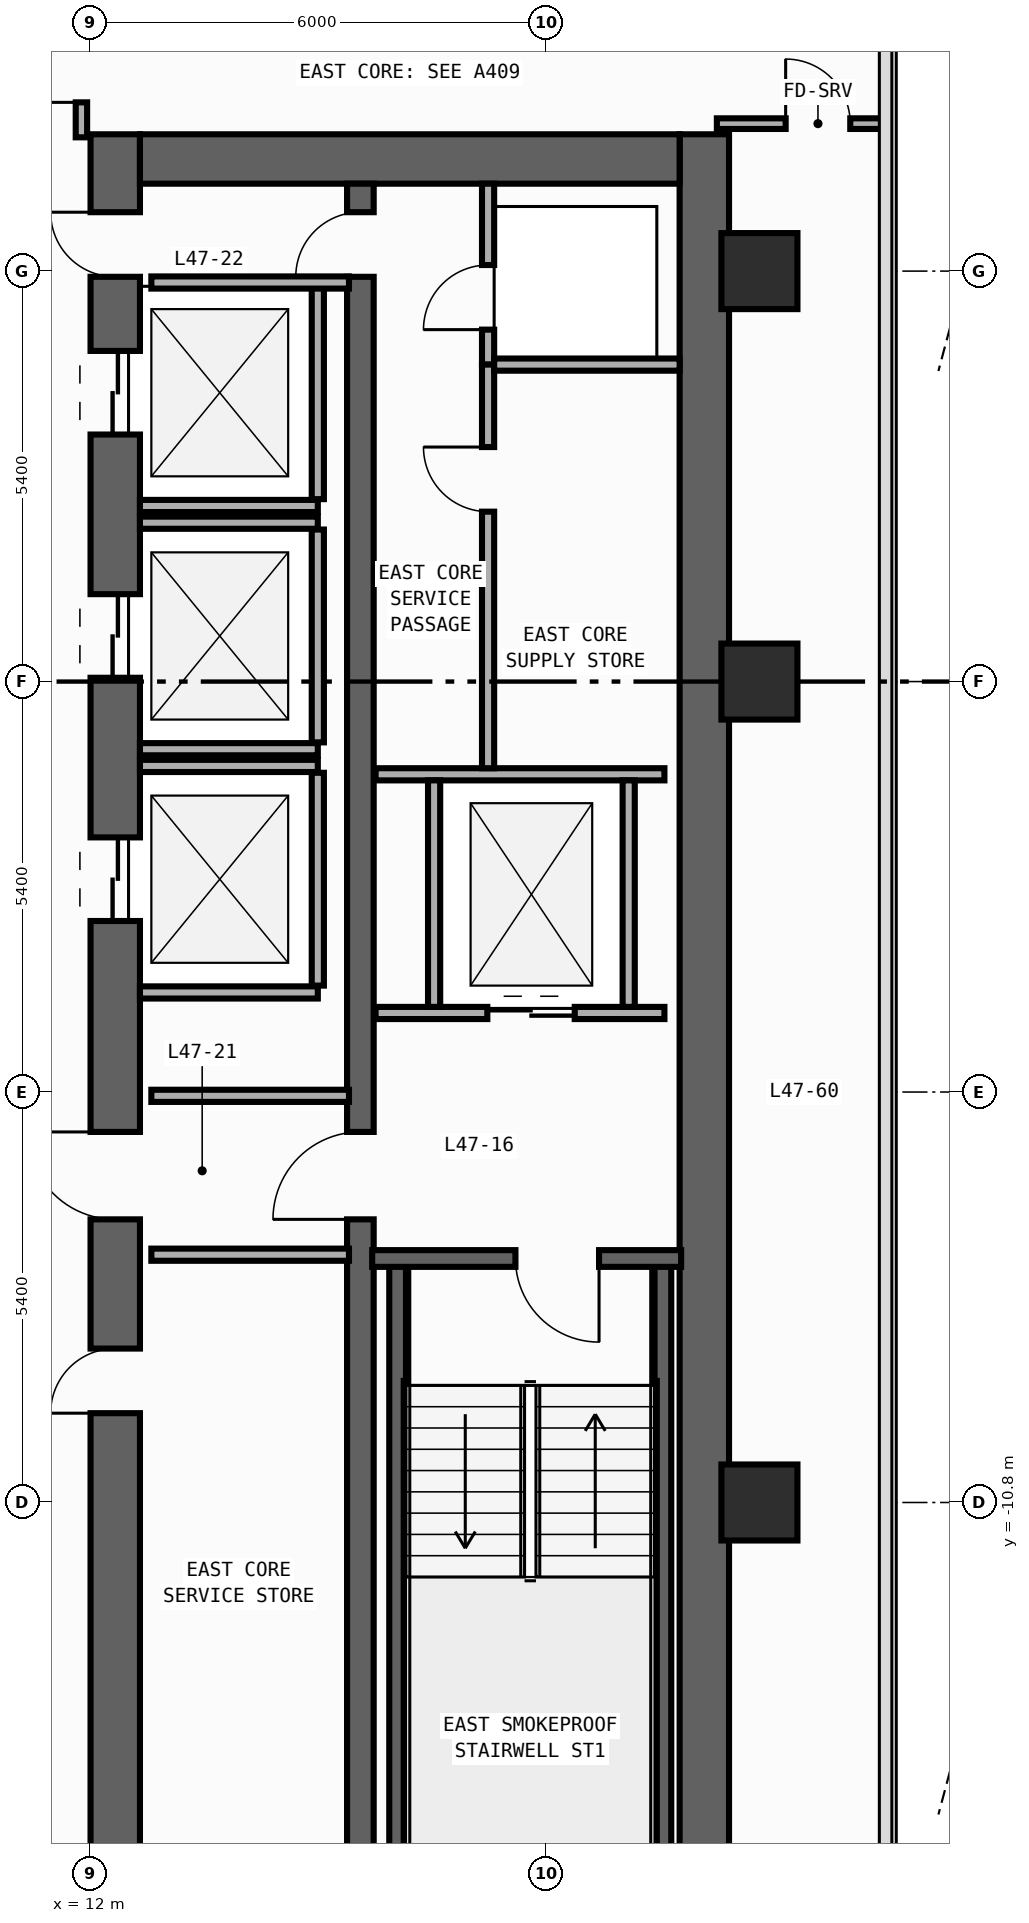
"""IFC4 building model, lengths in metres.
Left out: names, types, materials, properties, quantities, classifications, styles, units other than length and angle.
Written with IfcOpenShell. Run it as: python <this file> out.ifc"""

import sys

from ifc_helpers import new_model, si_unit, direction, frame, frame_2d, origin, origin_2d, place, context, subcontext, project, spatial, rectangle, extrude, element, fill, save


model = new_model("IFC4")
c1 = context("Model", 3, precision=1e-05, world=origin(), true_north=direction((0.0, 1.0)))
c2 = subcontext(c1, "Body", "Model", "MODEL_VIEW")
j1 = project(units=[si_unit("LENGTHUNIT", "METRE"), si_unit("PLANEANGLEUNIT", "RADIAN")], contexts=[c1])
p1 = place(None, origin())
s1 = spatial("IfcSite", under=j1, at=p1, CompositionType="ELEMENT")
p2 = place(p1, origin())
s2 = spatial("IfcBuilding", under=s1, at=p2, CompositionType="ELEMENT")
p3 = place(p2, frame((0.0, 0.0, 203.0)))
s3 = spatial("IfcBuildingStorey", under=s2, at=p3, CompositionType="ELEMENT", Elevation=203.0)
p4 = place(p3, frame((12.325, -19.8, 0.0), z_axis=(0.0, 0.0, 1.0), x_axis=(0.0, 1.0, 0.0)))
e1 = element("IfcWall", 1, at=p4, inside=s3, PredefinedType="SHEAR", context=c2, shape_type="SweptSolid", body=[
    extrude(rectangle(XDim=27.0, YDim=0.65, at=frame_2d((13.5, 0.0))), origin(), (0.0, 0.0, 1.0), 3.54),
])
p5 = place(p4, frame((23.05, 0.0, 0.0)))
e2 = element("IfcOpeningElement", 2, at=p5, cuts=e1, PredefinedType="OPENING", context=c2, shape_type="SweptSolid", body=[
    extrude(rectangle(XDim=1.1, YDim=2.2, at=frame_2d((0.55, 1.1))), frame((0.0, 0.335, 0.0), z_axis=(0.0, -1.0, 0.0), x_axis=(1.0, 0.0, 0.0)), (0.0, 0.0, 1.0), 0.67),
])
p6 = place(p4, frame((19.85, 0.0, 0.0)))
e3 = element("IfcOpeningElement", 3, at=p6, cuts=e1, PredefinedType="OPENING", context=c2, shape_type="SweptSolid", body=[
    extrude(rectangle(XDim=1.1, YDim=2.2, at=frame_2d((0.55, 1.1))), frame((0.0, 0.335, 0.0), z_axis=(0.0, -1.0, 0.0), x_axis=(1.0, 0.0, 0.0)), (0.0, 0.0, 1.0), 0.67),
])
p7 = place(p4, frame((16.65, 0.0, 0.0)))
e4 = element("IfcOpeningElement", 4, at=p7, cuts=e1, PredefinedType="OPENING", context=c2, shape_type="SweptSolid", body=[
    extrude(rectangle(XDim=1.1, YDim=2.2, at=frame_2d((0.55, 1.1))), frame((0.0, 0.335, 0.0), z_axis=(0.0, -1.0, 0.0), x_axis=(1.0, 0.0, 0.0)), (0.0, 0.0, 1.0), 0.67),
])
p8 = place(p4, frame((10.175, 0.0, 0.0)))
e5 = element("IfcOpeningElement", 5, at=p8, cuts=e1, PredefinedType="OPENING", context=c2, shape_type="SweptSolid", body=[
    extrude(rectangle(XDim=0.85, YDim=2.1, at=frame_2d((0.425, 1.05))), frame((0.0, 0.335, 0.0), z_axis=(0.0, -1.0, 0.0), x_axis=(1.0, 0.0, 0.0)), (0.0, 0.0, 1.0), 0.67),
])
p9 = place(p4, frame((12.725, 0.0, 0.0)))
e6 = element("IfcOpeningElement", 6, at=p9, cuts=e1, PredefinedType="OPENING", context=c2, shape_type="SweptSolid", body=[
    extrude(rectangle(XDim=1.15, YDim=2.2, at=frame_2d((0.575, 1.1))), frame((0.0, 0.335, 0.0), z_axis=(0.0, -1.0, 0.0), x_axis=(1.0, 0.0, 0.0)), (0.0, 0.0, 1.0), 0.67),
])
p10 = place(p4, frame((25.125, 0.0, 0.0)))
e7 = element("IfcOpeningElement", 7, at=p10, cuts=e1, PredefinedType="OPENING", context=c2, shape_type="SweptSolid", body=[
    extrude(rectangle(XDim=0.85, YDim=2.1, at=frame_2d((0.425, 1.05))), frame((0.0, 0.335, 0.0), z_axis=(0.0, -1.0, 0.0), x_axis=(1.0, 0.0, 0.0)), (0.0, 0.0, 1.0), 0.67),
])
p11 = place(p3, frame((20.075, -19.8, 0.0), z_axis=(0.0, 0.0, 1.0), x_axis=(0.0, 1.0, 0.0)))
e8 = element("IfcWall", 8, at=p11, inside=s3, PredefinedType="SHEAR", context=c2, shape_type="SweptSolid", body=[
    extrude(rectangle(XDim=27.0, YDim=0.65, at=frame_2d((13.5, 0.0))), origin(), (0.0, 0.0, 1.0), 3.54),
])
p12 = place(p3, frame((12.65, 6.875, 0.0), z_axis=(0.0, 0.0, 1.0), x_axis=(1.0, 0.0, 0.0)))
e9 = element("IfcWall", 9, at=p12, inside=s3, PredefinedType="SHEAR", context=c2, shape_type="SweptSolid", body=[
    extrude(rectangle(XDim=7.1, YDim=0.65, at=frame_2d((3.55, 0.0))), origin(), (0.0, 0.0, 1.0), 3.54),
])
p13 = place(p3, frame((15.55, -19.15, 0.0), z_axis=(0.0, 0.0, 1.0), x_axis=(0.0, 1.0, 0.0)))
e10 = element("IfcWall", 10, at=p13, inside=s3, PredefinedType="SHEAR", context=c2, shape_type="SweptSolid", body=[
    extrude(rectangle(XDim=25.7, YDim=0.35, at=frame_2d((12.85, 0.0))), origin(), (0.0, 0.0, 1.0), 3.54),
])
p14 = place(p13, frame((12.075, 0.0, 0.0)))
e11 = element("IfcOpeningElement", 11, at=p14, cuts=e10, PredefinedType="OPENING", context=c2, shape_type="SweptSolid", body=[
    extrude(rectangle(XDim=1.15, YDim=2.2, at=frame_2d((0.575, 1.1))), frame((0.0, 0.185, 0.0), z_axis=(0.0, -1.0, 0.0), x_axis=(1.0, 0.0, 0.0)), (0.0, 0.0, 1.0), 0.37),
])
p15 = place(p13, frame((24.475, 0.0, 0.0)))
e12 = element("IfcOpeningElement", 12, at=p15, cuts=e10, PredefinedType="OPENING", context=c2, shape_type="SweptSolid", body=[
    extrude(rectangle(XDim=0.85, YDim=2.1, at=frame_2d((0.425, 1.05))), frame((0.0, 0.185, 0.0), z_axis=(0.0, -1.0, 0.0), x_axis=(1.0, 0.0, 0.0)), (0.0, 0.0, 1.0), 0.37),
])
for number, where, z_axis, x_axis in (
    (13, (16.04, -19.01, 0.0), (0.0, 0.0, 1.0), (0.0, 1.0, 0.0)),
    (14, (19.53, -19.01, 0.0), (0.0, 0.0, 1.0), (0.0, 1.0, 0.0)),
):
    element("IfcWall", number, at=place(p3, frame(where, z_axis=z_axis, x_axis=x_axis)), inside=s3, PredefinedType="SHEAR", context=c2, shape_type="SweptSolid", body=[
        extrude(rectangle(XDim=11.42, YDim=0.22, at=frame_2d((5.71, 0.0))), origin(), (0.0, 0.0, 1.0), 3.54),
    ])
p16 = place(p3, frame((19.77, -7.59, 0.0), z_axis=(0.0, 0.0, 1.0), x_axis=(-1.0, 0.0, 0.0)))
e15 = element("IfcWall", 15, at=p16, inside=s3, PredefinedType="SHEAR", context=c2, shape_type="SweptSolid", body=[
    extrude(rectangle(XDim=4.065, YDim=0.22, at=frame_2d((2.032, 0.0))), origin(), (0.0, 0.0, 1.0), 3.54),
])
p17 = place(p16, frame((1.08, 0.0, 0.0)))
e16 = element("IfcOpeningElement", 16, at=p17, cuts=e15, PredefinedType="OPENING", context=c2, shape_type="SweptSolid", body=[
    extrude(rectangle(XDim=1.1, YDim=2.2, at=frame_2d((0.55, 1.1))), frame((0.0, 0.12, 0.0), z_axis=(0.0, -1.0, 0.0), x_axis=(1.0, 0.0, 0.0)), (0.0, 0.0, 1.0), 0.24),
])
for number, where, z_axis, x_axis in (
    (17, (20.8, -10.8, 0.0), (0.0, 0.0, 1.0), (1.0, 0.0, 0.0)),
    (18, (20.8, 0.0, 0.0), (0.0, 0.0, 1.0), (1.0, 0.0, 0.0)),
    (19, (20.8, 5.4, 0.0), (0.0, 0.0, 1.0), (1.0, 0.0, 0.0)),
):
    element("IfcColumn", number, at=place(p3, frame(where, z_axis=z_axis, x_axis=x_axis)), inside=s3, PredefinedType="COLUMN", context=c2, shape_type="SweptSolid", body=[
        extrude(rectangle(XDim=1.0, YDim=1.0, at=origin_2d()), origin(), (0.0, 0.0, 1.0), 3.8),
    ])
p18 = place(p3, frame((12.65, 2.31, 0.0), z_axis=(0.0, 0.0, 1.0), x_axis=(1.0, 0.0, 0.0)))
e20 = element("IfcWall", 20, at=p18, inside=s3, PredefinedType="STANDARD", context=c2, shape_type="SweptSolid", body=[
    extrude(rectangle(XDim=2.34, YDim=0.16, at=frame_2d((1.17, 0.0))), origin(), (0.0, 0.0, 1.0), 3.54),
])
p19 = place(p3, frame((14.99, 2.4, 0.0), z_axis=(0.0, 0.0, 1.0), x_axis=(0.0, 1.0, 0.0)))
e21 = element("IfcWall", 21, at=p19, inside=s3, PredefinedType="STANDARD", context=c2, shape_type="SweptSolid", body=[
    extrude(rectangle(XDim=2.8, YDim=0.16, at=frame_2d((1.4, 0.0))), origin(), (0.0, 0.0, 1.0), 3.54),
])
for number, where, z_axis, x_axis in (
    (22, (12.65, -0.89, 0.0), (0.0, 0.0, 1.0), (1.0, 0.0, 0.0)),
    (23, (12.65, 2.09, 0.0), (0.0, 0.0, 1.0), (1.0, 0.0, 0.0)),
):
    element("IfcWall", number, at=place(p3, frame(where, z_axis=z_axis, x_axis=x_axis)), inside=s3, PredefinedType="STANDARD", context=c2, shape_type="SweptSolid", body=[
        extrude(rectangle(XDim=2.34, YDim=0.16, at=frame_2d((1.17, 0.0))), origin(), (0.0, 0.0, 1.0), 3.54),
    ])
p20 = place(p3, frame((14.99, -0.8, 0.0), z_axis=(0.0, 0.0, 1.0), x_axis=(0.0, 1.0, 0.0)))
e24 = element("IfcWall", 24, at=p20, inside=s3, PredefinedType="STANDARD", context=c2, shape_type="SweptSolid", body=[
    extrude(rectangle(XDim=2.8, YDim=0.16, at=frame_2d((1.4, 0.0))), origin(), (0.0, 0.0, 1.0), 3.54),
])
for number, where, z_axis, x_axis in (
    (25, (12.65, -4.09, 0.0), (0.0, 0.0, 1.0), (1.0, 0.0, 0.0)),
    (26, (12.65, -1.11, 0.0), (0.0, 0.0, 1.0), (1.0, 0.0, 0.0)),
):
    element("IfcWall", number, at=place(p3, frame(where, z_axis=z_axis, x_axis=x_axis)), inside=s3, PredefinedType="STANDARD", context=c2, shape_type="SweptSolid", body=[
        extrude(rectangle(XDim=2.34, YDim=0.16, at=frame_2d((1.17, 0.0))), origin(), (0.0, 0.0, 1.0), 3.54),
    ])
p21 = place(p3, frame((14.99, -4.0, 0.0), z_axis=(0.0, 0.0, 1.0), x_axis=(0.0, 1.0, 0.0)))
e27 = element("IfcWall", 27, at=p21, inside=s3, PredefinedType="STANDARD", context=c2, shape_type="SweptSolid", body=[
    extrude(rectangle(XDim=2.8, YDim=0.16, at=frame_2d((1.4, 0.0))), origin(), (0.0, 0.0, 1.0), 3.54),
])
p22 = place(p3, frame((15.75, -4.36, 0.0), z_axis=(0.0, 0.0, 1.0), x_axis=(1.0, 0.0, 0.0)))
e28 = element("IfcWall", 28, at=p22, inside=s3, PredefinedType="STANDARD", context=c2, shape_type="SweptSolid", body=[
    extrude(rectangle(XDim=3.8, YDim=0.16, at=frame_2d((1.9, 0.0))), origin(), (0.0, 0.0, 1.0), 3.54),
])
p23 = place(p22, frame((1.47, 0.0, 0.0)))
e29 = element("IfcOpeningElement", 29, at=p23, cuts=e28, PredefinedType="OPENING", context=c2, shape_type="SweptSolid", body=[
    extrude(rectangle(XDim=1.15, YDim=2.2, at=frame_2d((0.575, 1.1))), frame((0.0, 0.09, 0.0), z_axis=(0.0, -1.0, 0.0), x_axis=(1.0, 0.0, 0.0)), (0.0, 0.0, 1.0), 0.18),
])
p24 = place(p3, frame((15.75, -1.22, 0.0), z_axis=(0.0, 0.0, 1.0), x_axis=(1.0, 0.0, 0.0)))
e30 = element("IfcWall", 30, at=p24, inside=s3, PredefinedType="STANDARD", context=c2, shape_type="SweptSolid", body=[
    extrude(rectangle(XDim=3.8, YDim=0.16, at=frame_2d((1.9, 0.0))), origin(), (0.0, 0.0, 1.0), 3.54),
])
for number, where, z_axis, x_axis in (
    (31, (16.52, -4.28, 0.0), (0.0, 0.0, 1.0), (0.0, 1.0, 0.0)),
    (32, (19.08, -4.28, 0.0), (0.0, 0.0, 1.0), (0.0, 1.0, 0.0)),
):
    element("IfcWall", number, at=place(p3, frame(where, z_axis=z_axis, x_axis=x_axis)), inside=s3, PredefinedType="STANDARD", context=c2, shape_type="SweptSolid", body=[
        extrude(rectangle(XDim=2.98, YDim=0.16, at=frame_2d((1.49, 0.0))), origin(), (0.0, 0.0, 1.0), 3.54),
    ])
for number, where, z_axis, x_axis in (
    (33, (12.8, -5.45, 0.0), (0.0, 0.0, 1.0), (1.0, 0.0, 0.0)),
    (34, (12.8, -7.54, 0.0), (0.0, 0.0, 1.0), (1.0, 0.0, 0.0)),
    (35, (12.8, 5.25, 0.0), (0.0, 0.0, 1.0), (1.0, 0.0, 0.0)),
):
    element("IfcWall", number, at=place(p3, frame(where, z_axis=z_axis, x_axis=x_axis)), inside=s3, PredefinedType="STANDARD", context=c2, shape_type="SweptSolid", body=[
        extrude(rectangle(XDim=2.6, YDim=0.16, at=frame_2d((1.3, 0.0))), origin(), (0.0, 0.0, 1.0), 3.54),
    ])
p25 = place(p3, frame((17.23, 4.17, 0.0), z_axis=(0.0, 0.0, 1.0), x_axis=(0.0, 1.0, 0.0)))
e36 = element("IfcWall", 36, at=p25, inside=s3, PredefinedType="PARTITIONING", context=c2, shape_type="SweptSolid", body=[
    extrude(rectangle(XDim=2.38, YDim=0.16, at=frame_2d((1.19, 0.0))), origin(), (0.0, 0.0, 1.0), 3.54),
])
p26 = place(p25, frame((0.46, 0.0, 0.0)))
e37 = element("IfcOpeningElement", 37, at=p26, cuts=e36, PredefinedType="OPENING", context=c2, shape_type="SweptSolid", body=[
    extrude(rectangle(XDim=0.85, YDim=2.1, at=frame_2d((0.425, 1.05))), frame((0.0, 0.09, 0.0), z_axis=(0.0, -1.0, 0.0), x_axis=(1.0, 0.0, 0.0)), (0.0, 0.0, 1.0), 0.18),
])
p27 = place(p3, frame((17.23, -1.14, 0.0), z_axis=(0.0, 0.0, 1.0), x_axis=(0.0, 1.0, 0.0)))
e38 = element("IfcWall", 38, at=p27, inside=s3, PredefinedType="PARTITIONING", context=c2, shape_type="SweptSolid", body=[
    extrude(rectangle(XDim=5.31, YDim=0.16, at=frame_2d((2.655, 0.0))), origin(), (0.0, 0.0, 1.0), 3.54),
])
p28 = place(p27, frame((3.375, 0.0, 0.0)))
e39 = element("IfcOpeningElement", 39, at=p28, cuts=e38, PredefinedType="OPENING", context=c2, shape_type="SweptSolid", body=[
    extrude(rectangle(XDim=0.85, YDim=2.1, at=frame_2d((0.425, 1.05))), frame((0.0, 0.09, 0.0), z_axis=(0.0, -1.0, 0.0), x_axis=(1.0, 0.0, 0.0)), (0.0, 0.0, 1.0), 0.18),
])
p29 = place(p3, frame((17.31, 4.17, 0.0), z_axis=(0.0, 0.0, 1.0), x_axis=(1.0, 0.0, 0.0)))
e40 = element("IfcWall", 40, at=p29, inside=s3, PredefinedType="PARTITIONING", context=c2, shape_type="SweptSolid", body=[
    extrude(rectangle(XDim=2.44, YDim=0.16, at=frame_2d((1.22, 0.0))), origin(), (0.0, 0.0, 1.0), 3.54),
])
p30 = place(p3, frame((11.88, 7.16, 0.0), z_axis=(0.0, 0.0, 1.0), x_axis=(0.0, 1.0, 0.0)))
e41 = element("IfcWall", 41, at=p30, inside=s3, PredefinedType="PARTITIONING", context=c2, shape_type="SweptSolid", body=[
    extrude(rectangle(XDim=8.855, YDim=0.15, at=frame_2d((4.427, 0.0))), origin(), (0.0, 0.0, 1.0), 3.54),
])
p31 = place(p30, frame((0.46, 0.0, 0.0)))
e42 = element("IfcOpeningElement", 42, at=p31, cuts=e41, PredefinedType="OPENING", context=c2, shape_type="SweptSolid", body=[
    extrude(rectangle(XDim=0.9, YDim=2.15, at=frame_2d((0.45, 1.075))), frame((0.0, 0.085, 0.0), z_axis=(0.0, -1.0, 0.0), x_axis=(1.0, 0.0, 0.0)), (0.0, 0.0, 1.0), 0.17),
])
p32 = place(p3, frame((20.24, 7.34, 0.0), z_axis=(0.0, 0.0, 1.0), x_axis=(1.0, 0.0, 0.0)))
e43 = element("IfcWall", 43, at=p32, inside=s3, PredefinedType="PARTITIONING", context=c2, shape_type="SweptSolid", body=[
    extrude(rectangle(XDim=2.215, YDim=0.14, at=frame_2d((1.107, 0.0))), origin(), (0.0, 0.0, 1.0), 3.54),
])
p33 = place(p32, frame((0.905, 0.0, 0.0)))
e44 = element("IfcOpeningElement", 44, at=p33, cuts=e43, PredefinedType="OPENING", context=c2, shape_type="SweptSolid", body=[
    extrude(rectangle(XDim=0.85, YDim=2.1, at=frame_2d((0.425, 1.05))), frame((0.0, 0.08, 0.0), z_axis=(0.0, -1.0, 0.0), x_axis=(1.0, 0.0, 0.0)), (0.0, 0.0, 1.0), 0.16),
])
p34 = place(p17, origin())
e45 = element("IfcDoor", 45, at=p34, inside=s3, OperationType="SINGLE_SWING_LEFT", PredefinedType="DOOR", context=c2, shape_type="SweptSolid", body=[
    extrude(rectangle(XDim=1.1, YDim=2.2, at=frame_2d((0.55, 1.1))), frame((0.0, 0.025, 0.0), z_axis=(0.0, -1.0, 0.0), x_axis=(1.0, 0.0, 0.0)), (0.0, 0.0, 1.0), 0.05),
])
fill(e16, e45)
p35 = place(p5, origin())
e46 = element("IfcDoor", 46, at=p35, inside=s3, OperationType="DOUBLE_DOOR_SLIDING", PredefinedType="DOOR", context=c2, shape_type="SweptSolid", body=[
    extrude(rectangle(XDim=1.1, YDim=2.2, at=frame_2d((0.55, 1.1))), frame((0.0, 0.025, 0.0), z_axis=(0.0, -1.0, 0.0), x_axis=(1.0, 0.0, 0.0)), (0.0, 0.0, 1.0), 0.05),
])
fill(e2, e46)
p36 = place(p6, origin())
e47 = element("IfcDoor", 47, at=p36, inside=s3, OperationType="DOUBLE_DOOR_SLIDING", PredefinedType="DOOR", context=c2, shape_type="SweptSolid", body=[
    extrude(rectangle(XDim=1.1, YDim=2.2, at=frame_2d((0.55, 1.1))), frame((0.0, 0.025, 0.0), z_axis=(0.0, -1.0, 0.0), x_axis=(1.0, 0.0, 0.0)), (0.0, 0.0, 1.0), 0.05),
])
fill(e3, e47)
p37 = place(p7, origin())
e48 = element("IfcDoor", 48, at=p37, inside=s3, OperationType="DOUBLE_DOOR_SLIDING", PredefinedType="DOOR", context=c2, shape_type="SweptSolid", body=[
    extrude(rectangle(XDim=1.1, YDim=2.2, at=frame_2d((0.55, 1.1))), frame((0.0, 0.025, 0.0), z_axis=(0.0, -1.0, 0.0), x_axis=(1.0, 0.0, 0.0)), (0.0, 0.0, 1.0), 0.05),
])
fill(e4, e48)
p38 = place(p8, origin())
e49 = element("IfcDoor", 49, at=p38, inside=s3, OperationType="SINGLE_SWING_LEFT", PredefinedType="DOOR", context=c2, shape_type="SweptSolid", body=[
    extrude(rectangle(XDim=0.85, YDim=2.1, at=frame_2d((0.425, 1.05))), frame((0.0, 0.025, 0.0), z_axis=(0.0, -1.0, 0.0), x_axis=(1.0, 0.0, 0.0)), (0.0, 0.0, 1.0), 0.05),
])
fill(e5, e49)
p39 = place(p9, origin())
e50 = element("IfcDoor", 50, at=p39, inside=s3, OperationType="SINGLE_SWING_RIGHT", PredefinedType="DOOR", context=c2, shape_type="SweptSolid", body=[
    extrude(rectangle(XDim=1.15, YDim=2.2, at=frame_2d((0.575, 1.1))), frame((0.0, 0.025, 0.0), z_axis=(0.0, -1.0, 0.0), x_axis=(1.0, 0.0, 0.0)), (0.0, 0.0, 1.0), 0.05),
])
fill(e6, e50)
p40 = place(p14, origin())
e51 = element("IfcDoor", 51, at=p40, inside=s3, OperationType="SINGLE_SWING_LEFT", PredefinedType="DOOR", context=c2, shape_type="SweptSolid", body=[
    extrude(rectangle(XDim=1.15, YDim=2.2, at=frame_2d((0.575, 1.1))), frame((0.0, 0.025, 0.0), z_axis=(0.0, -1.0, 0.0), x_axis=(1.0, 0.0, 0.0)), (0.0, 0.0, 1.0), 0.05),
])
fill(e11, e51)
p41 = place(p10, origin())
e52 = element("IfcDoor", 52, at=p41, inside=s3, OperationType="SINGLE_SWING_RIGHT", PredefinedType="DOOR", context=c2, shape_type="SweptSolid", body=[
    extrude(rectangle(XDim=0.85, YDim=2.1, at=frame_2d((0.425, 1.05))), frame((0.0, 0.025, 0.0), z_axis=(0.0, -1.0, 0.0), x_axis=(1.0, 0.0, 0.0)), (0.0, 0.0, 1.0), 0.05),
])
fill(e7, e52)
p42 = place(p15, origin())
e53 = element("IfcDoor", 53, at=p42, inside=s3, OperationType="SINGLE_SWING_LEFT", PredefinedType="DOOR", context=c2, shape_type="SweptSolid", body=[
    extrude(rectangle(XDim=0.85, YDim=2.1, at=frame_2d((0.425, 1.05))), frame((0.0, 0.025, 0.0), z_axis=(0.0, -1.0, 0.0), x_axis=(1.0, 0.0, 0.0)), (0.0, 0.0, 1.0), 0.05),
])
fill(e12, e53)
p43 = place(p23, origin())
e54 = element("IfcDoor", 54, at=p43, inside=s3, OperationType="DOUBLE_DOOR_SLIDING", PredefinedType="DOOR", context=c2, shape_type="SweptSolid", body=[
    extrude(rectangle(XDim=1.15, YDim=2.2, at=frame_2d((0.575, 1.1))), frame((0.0, 0.025, 0.0), z_axis=(0.0, -1.0, 0.0), x_axis=(1.0, 0.0, 0.0)), (0.0, 0.0, 1.0), 0.05),
])
fill(e29, e54)
p44 = place(p26, origin())
e55 = element("IfcDoor", 55, at=p44, inside=s3, OperationType="SINGLE_SWING_LEFT", PredefinedType="DOOR", context=c2, shape_type="SweptSolid", body=[
    extrude(rectangle(XDim=0.85, YDim=2.1, at=frame_2d((0.425, 1.05))), frame((0.0, 0.025, 0.0), z_axis=(0.0, -1.0, 0.0), x_axis=(1.0, 0.0, 0.0)), (0.0, 0.0, 1.0), 0.05),
])
fill(e37, e55)
p45 = place(p28, origin())
e56 = element("IfcDoor", 56, at=p45, inside=s3, OperationType="SINGLE_SWING_RIGHT", PredefinedType="DOOR", context=c2, shape_type="SweptSolid", body=[
    extrude(rectangle(XDim=0.85, YDim=2.1, at=frame_2d((0.425, 1.05))), frame((0.0, 0.025, 0.0), z_axis=(0.0, -1.0, 0.0), x_axis=(1.0, 0.0, 0.0)), (0.0, 0.0, 1.0), 0.05),
])
fill(e39, e56)
p46 = place(p31, origin())
e57 = element("IfcDoor", 57, at=p46, inside=s3, OperationType="SINGLE_SWING_LEFT", PredefinedType="DOOR", context=c2, shape_type="SweptSolid", body=[
    extrude(rectangle(XDim=0.9, YDim=2.15, at=frame_2d((0.45, 1.075))), frame((0.0, 0.025, 0.0), z_axis=(0.0, -1.0, 0.0), x_axis=(1.0, 0.0, 0.0)), (0.0, 0.0, 1.0), 0.05),
])
fill(e42, e57)
p47 = place(p33, origin())
e58 = element("IfcDoor", 58, at=p47, inside=s3, OperationType="SINGLE_SWING_LEFT", PredefinedType="DOOR", context=c2, shape_type="SweptSolid", body=[
    extrude(rectangle(XDim=0.85, YDim=2.1, at=frame_2d((0.425, 1.05))), frame((0.0, 0.025, 0.0), z_axis=(0.0, -1.0, 0.0), x_axis=(1.0, 0.0, 0.0)), (0.0, 0.0, 1.0), 0.05),
])
fill(e44, e58)
save(model, sys.argv[1])
